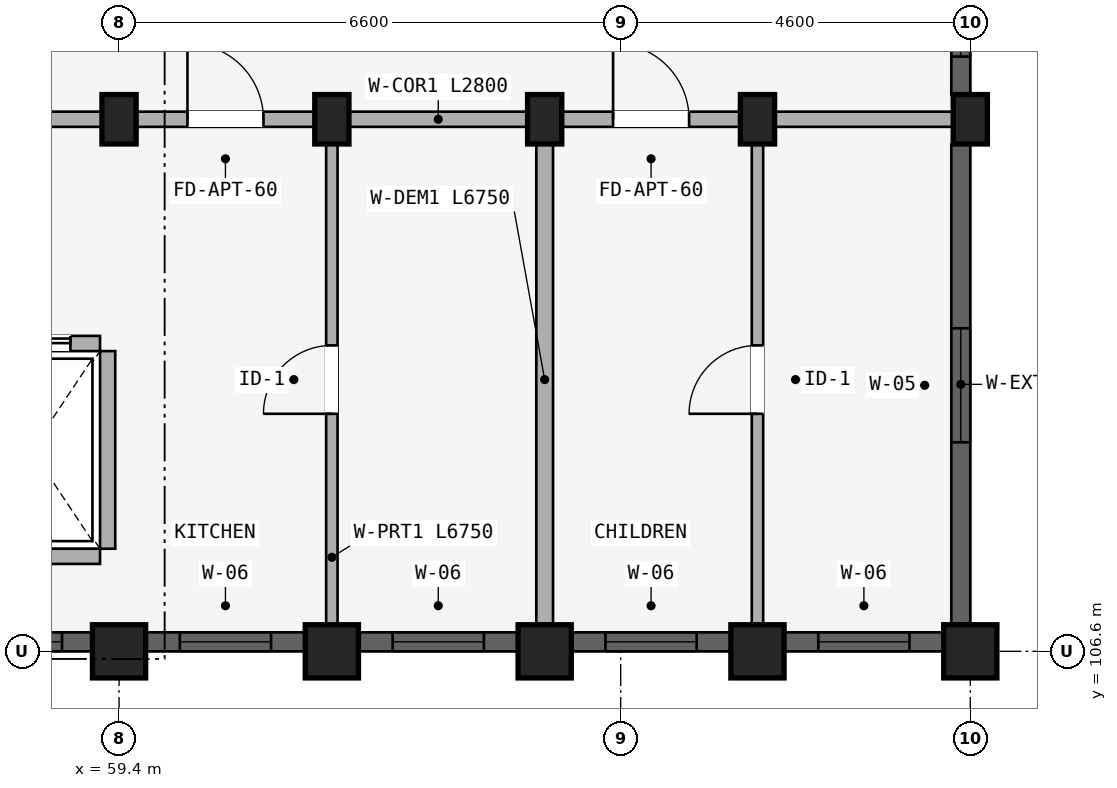
"""IFC4 building model, lengths in metres.
Left out: names, types, materials, properties, quantities, classifications, styles, units other than length and angle.
Written with IfcOpenShell. Run it as: python <this file> out.ifc"""

import sys

from ifc_helpers import new_model, si_unit, direction, frame, frame_2d, origin, origin_2d, place, context, subcontext, project, spatial, rectangle, extrude, element, fill, save


model = new_model("IFC4")
c1 = context("Model", 3, precision=1e-05, world=origin(), true_north=direction((0.0, 1.0)))
c2 = subcontext(c1, "Body", "Model", "MODEL_VIEW")
j1 = project(units=[si_unit("LENGTHUNIT", "METRE"), si_unit("PLANEANGLEUNIT", "RADIAN")], contexts=[c1])
p1 = place(None, origin())
s1 = spatial("IfcSite", under=j1, at=p1, CompositionType="ELEMENT")
p2 = place(p1, origin())
s2 = spatial("IfcBuilding", under=s1, at=p2, CompositionType="ELEMENT")
p3 = place(p2, frame((0.0, 0.0, 27.6)))
s3 = spatial("IfcBuildingStorey", under=s2, at=p3, CompositionType="ELEMENT", Elevation=27.6)
p4 = place(p3, frame((59.4, 106.6, 0.0), z_axis=(0.0, 0.0, 1.0), x_axis=(1.0, 0.0, 0.0)))
e1 = element("IfcColumn", 1, at=p4, inside=s3, PredefinedType="COLUMN", context=c2, shape_type="SweptSolid", body=[
    extrude(rectangle(XDim=0.7, YDim=0.7, at=origin_2d()), origin(), (0.0, 0.0, 1.0), 2.93),
])
p5 = place(p3, frame((59.4, 113.6, 0.0), z_axis=(0.0, 0.0, 1.0), x_axis=(1.0, 0.0, 0.0)))
e2 = element("IfcColumn", 2, at=p5, inside=s3, PredefinedType="COLUMN", context=c2, shape_type="SweptSolid", body=[
    extrude(rectangle(XDim=0.45, YDim=0.65, at=origin_2d()), origin(), (0.0, 0.0, 1.0), 2.93),
])
p6 = place(p3, frame((62.2, 106.6, 0.0), z_axis=(0.0, 0.0, 1.0), x_axis=(1.0, 0.0, 0.0)))
e3 = element("IfcColumn", 3, at=p6, inside=s3, PredefinedType="COLUMN", context=c2, shape_type="SweptSolid", body=[
    extrude(rectangle(XDim=0.7, YDim=0.7, at=origin_2d()), origin(), (0.0, 0.0, 1.0), 2.93),
])
p7 = place(p3, frame((62.2, 113.6, 0.0), z_axis=(0.0, 0.0, 1.0), x_axis=(1.0, 0.0, 0.0)))
e4 = element("IfcColumn", 4, at=p7, inside=s3, PredefinedType="COLUMN", context=c2, shape_type="SweptSolid", body=[
    extrude(rectangle(XDim=0.45, YDim=0.65, at=origin_2d()), origin(), (0.0, 0.0, 1.0), 2.93),
])
p8 = place(p3, frame((65.0, 106.6, 0.0), z_axis=(0.0, 0.0, 1.0), x_axis=(1.0, 0.0, 0.0)))
e5 = element("IfcColumn", 5, at=p8, inside=s3, PredefinedType="COLUMN", context=c2, shape_type="SweptSolid", body=[
    extrude(rectangle(XDim=0.7, YDim=0.7, at=origin_2d()), origin(), (0.0, 0.0, 1.0), 2.93),
])
p9 = place(p3, frame((65.0, 113.6, 0.0), z_axis=(0.0, 0.0, 1.0), x_axis=(1.0, 0.0, 0.0)))
e6 = element("IfcColumn", 6, at=p9, inside=s3, PredefinedType="COLUMN", context=c2, shape_type="SweptSolid", body=[
    extrude(rectangle(XDim=0.45, YDim=0.65, at=origin_2d()), origin(), (0.0, 0.0, 1.0), 2.93),
])
p10 = place(p3, frame((67.8, 106.6, 0.0), z_axis=(0.0, 0.0, 1.0), x_axis=(1.0, 0.0, 0.0)))
e7 = element("IfcColumn", 7, at=p10, inside=s3, PredefinedType="COLUMN", context=c2, shape_type="SweptSolid", body=[
    extrude(rectangle(XDim=0.7, YDim=0.7, at=origin_2d()), origin(), (0.0, 0.0, 1.0), 2.93),
])
p11 = place(p3, frame((67.8, 113.6, 0.0), z_axis=(0.0, 0.0, 1.0), x_axis=(1.0, 0.0, 0.0)))
e8 = element("IfcColumn", 8, at=p11, inside=s3, PredefinedType="COLUMN", context=c2, shape_type="SweptSolid", body=[
    extrude(rectangle(XDim=0.45, YDim=0.65, at=origin_2d()), origin(), (0.0, 0.0, 1.0), 2.93),
])
p12 = place(p3, frame((70.6, 106.6, 0.0), z_axis=(0.0, 0.0, 1.0), x_axis=(1.0, 0.0, 0.0)))
e9 = element("IfcColumn", 9, at=p12, inside=s3, PredefinedType="COLUMN", context=c2, shape_type="SweptSolid", body=[
    extrude(rectangle(XDim=0.7, YDim=0.7, at=origin_2d()), origin(), (0.0, 0.0, 1.0), 2.93),
])
p13 = place(p3, frame((70.6, 113.6, 0.0), z_axis=(0.0, 0.0, 1.0), x_axis=(1.0, 0.0, 0.0)))
e10 = element("IfcColumn", 10, at=p13, inside=s3, PredefinedType="COLUMN", context=c2, shape_type="SweptSolid", body=[
    extrude(rectangle(XDim=0.45, YDim=0.65, at=origin_2d()), origin(), (0.0, 0.0, 1.0), 2.93),
])
p14 = place(p3, frame((59.25, 107.95, 0.0), z_axis=(0.0, 0.0, 1.0), x_axis=(0.0, 1.0, 0.0)))
e11 = element("IfcWall", 11, at=p14, inside=s3, PredefinedType="STANDARD", context=c2, shape_type="SweptSolid", body=[
    extrude(rectangle(XDim=2.6, YDim=0.2, at=frame_2d((1.3, 0.0))), origin(), (0.0, 0.0, 1.0), 2.372),
])
p15 = place(p3, frame((57.35, 107.85, 0.0), z_axis=(0.0, 0.0, 1.0), x_axis=(1.0, 0.0, 0.0)))
e12 = element("IfcWall", 12, at=p15, inside=s3, PredefinedType="STANDARD", context=c2, shape_type="SweptSolid", body=[
    extrude(rectangle(XDim=1.8, YDim=0.2, at=frame_2d((0.9, 0.0))), origin(), (0.0, 0.0, 1.0), 2.93),
])
p16 = place(p3, frame((57.35, 110.65, 0.0), z_axis=(0.0, 0.0, 1.0), x_axis=(1.0, 0.0, 0.0)))
e13 = element("IfcWall", 13, at=p16, inside=s3, PredefinedType="STANDARD", context=c2, shape_type="SweptSolid", body=[
    extrude(rectangle(XDim=1.8, YDim=0.2, at=frame_2d((0.9, 0.0))), origin(), (0.0, 0.0, 1.0), 2.93),
])
p17 = place(p16, frame((0.39, 0.0, 0.0)))
e14 = element("IfcOpeningElement", 14, at=p17, cuts=e13, PredefinedType="OPENING", context=c2, shape_type="SweptSolid", body=[
    extrude(rectangle(XDim=1.02, YDim=2.15, at=frame_2d((0.51, 1.075))), frame((0.0, 0.11, 0.0), z_axis=(0.0, -1.0, 0.0), x_axis=(1.0, 0.0, 0.0)), (0.0, 0.0, 1.0), 0.22),
])
p18 = place(p3, frame((53.75, 113.6, 0.0), z_axis=(0.0, 0.0, 1.0), x_axis=(1.0, 0.0, 0.0)))
e15 = element("IfcWall", 15, at=p18, inside=s3, PredefinedType="STANDARD", context=c2, shape_type="SweptSolid", body=[
    extrude(rectangle(XDim=5.6, YDim=0.2, at=frame_2d((2.8, 0.0))), origin(), (0.0, 0.0, 1.0), 2.372),
])
p19 = place(p18, frame((1.91, 0.0, 0.0)))
e16 = element("IfcOpeningElement", 16, at=p19, cuts=e15, PredefinedType="OPENING", context=c2, shape_type="SweptSolid", body=[
    extrude(rectangle(XDim=1.22, YDim=2.15, at=frame_2d((0.61, 1.075))), frame((0.0, 0.11, 0.0), z_axis=(0.0, -1.0, 0.0), x_axis=(1.0, 0.0, 0.0)), (0.0, 0.0, 1.0), 0.22),
])
p20 = place(p3, frame((59.4, 113.6, 0.0), z_axis=(0.0, 0.0, 1.0), x_axis=(1.0, 0.0, 0.0)))
e17 = element("IfcWall", 17, at=p20, inside=s3, PredefinedType="STANDARD", context=c2, shape_type="SweptSolid", body=[
    extrude(rectangle(XDim=2.8, YDim=0.2, at=frame_2d((1.4, 0.0))), origin(), (0.0, 0.0, 1.0), 2.372),
])
p21 = place(p20, frame((0.9, 0.0, 0.0)))
e18 = element("IfcOpeningElement", 18, at=p21, cuts=e17, PredefinedType="OPENING", context=c2, shape_type="SweptSolid", body=[
    extrude(rectangle(XDim=1.0, YDim=2.15, at=frame_2d((0.5, 1.075))), frame((0.0, 0.11, 0.0), z_axis=(0.0, -1.0, 0.0), x_axis=(1.0, 0.0, 0.0)), (0.0, 0.0, 1.0), 0.22),
])
p22 = place(p3, frame((62.2, 113.6, 0.0), z_axis=(0.0, 0.0, 1.0), x_axis=(1.0, 0.0, 0.0)))
e19 = element("IfcWall", 19, at=p22, inside=s3, PredefinedType="STANDARD", context=c2, shape_type="SweptSolid", body=[
    extrude(rectangle(XDim=2.8, YDim=0.2, at=frame_2d((1.4, 0.0))), origin(), (0.0, 0.0, 1.0), 2.372),
])
p23 = place(p3, frame((65.0, 113.6, 0.0), z_axis=(0.0, 0.0, 1.0), x_axis=(1.0, 0.0, 0.0)))
e20 = element("IfcWall", 20, at=p23, inside=s3, PredefinedType="STANDARD", context=c2, shape_type="SweptSolid", body=[
    extrude(rectangle(XDim=2.8, YDim=0.2, at=frame_2d((1.4, 0.0))), origin(), (0.0, 0.0, 1.0), 2.372),
])
p24 = place(p23, frame((0.9, 0.0, 0.0)))
e21 = element("IfcOpeningElement", 21, at=p24, cuts=e20, PredefinedType="OPENING", context=c2, shape_type="SweptSolid", body=[
    extrude(rectangle(XDim=1.0, YDim=2.15, at=frame_2d((0.5, 1.075))), frame((0.0, 0.11, 0.0), z_axis=(0.0, -1.0, 0.0), x_axis=(1.0, 0.0, 0.0)), (0.0, 0.0, 1.0), 0.22),
])
p25 = place(p3, frame((67.8, 113.6, 0.0), z_axis=(0.0, 0.0, 1.0), x_axis=(1.0, 0.0, 0.0)))
e22 = element("IfcWall", 22, at=p25, inside=s3, PredefinedType="STANDARD", context=c2, shape_type="SweptSolid", body=[
    extrude(rectangle(XDim=2.8, YDim=0.2, at=frame_2d((1.4, 0.0))), origin(), (0.0, 0.0, 1.0), 2.372),
])
p26 = place(p3, frame((62.2, 106.8, 0.0), z_axis=(0.0, 0.0, 1.0), x_axis=(0.0, 1.0, 0.0)))
e23 = element("IfcWall", 23, at=p26, inside=s3, PredefinedType="PARTITIONING", context=c2, shape_type="SweptSolid", body=[
    extrude(rectangle(XDim=6.75, YDim=0.15, at=frame_2d((3.375, 0.0))), origin(), (0.0, 0.0, 1.0), 2.372),
])
p27 = place(p26, frame((2.925, 0.0, 0.0)))
e24 = element("IfcOpeningElement", 24, at=p27, cuts=e23, PredefinedType="OPENING", context=c2, shape_type="SweptSolid", body=[
    extrude(rectangle(XDim=0.9, YDim=2.1, at=frame_2d((0.45, 1.05))), frame((0.0, 0.085, 0.0), z_axis=(0.0, -1.0, 0.0), x_axis=(1.0, 0.0, 0.0)), (0.0, 0.0, 1.0), 0.17),
])
p28 = place(p3, frame((65.0, 106.8, 0.0), z_axis=(0.0, 0.0, 1.0), x_axis=(0.0, 1.0, 0.0)))
e25 = element("IfcWall", 25, at=p28, inside=s3, PredefinedType="STANDARD", context=c2, shape_type="SweptSolid", body=[
    extrude(rectangle(XDim=6.75, YDim=0.22, at=frame_2d((3.375, 0.0))), origin(), (0.0, 0.0, 1.0), 2.372),
])
p29 = place(p3, frame((67.8, 106.8, 0.0), z_axis=(0.0, 0.0, 1.0), x_axis=(0.0, 1.0, 0.0)))
e26 = element("IfcWall", 26, at=p29, inside=s3, PredefinedType="PARTITIONING", context=c2, shape_type="SweptSolid", body=[
    extrude(rectangle(XDim=6.75, YDim=0.15, at=frame_2d((3.375, 0.0))), origin(), (0.0, 0.0, 1.0), 2.372),
])
p30 = place(p29, frame((2.925, 0.0, 0.0)))
e27 = element("IfcOpeningElement", 27, at=p30, cuts=e26, PredefinedType="OPENING", context=c2, shape_type="SweptSolid", body=[
    extrude(rectangle(XDim=0.9, YDim=2.1, at=frame_2d((0.45, 1.05))), frame((0.0, 0.085, 0.0), z_axis=(0.0, -1.0, 0.0), x_axis=(1.0, 0.0, 0.0)), (0.0, 0.0, 1.0), 0.17),
])
p31 = place(p3, frame((56.628, 106.725, 0.0), z_axis=(0.0, 0.0, 1.0), x_axis=(1.0, 0.0, 0.0)))
e28 = element("IfcWall", 28, at=p31, inside=s3, PredefinedType="STANDARD", context=c2, shape_type="SweptSolid", body=[
    extrude(rectangle(XDim=2.422, YDim=0.25, at=frame_2d((1.211, 0.0))), origin(), (0.0, 0.0, 1.0), 2.472),
])
p32 = place(p31, frame((0.822, 0.0, 0.772)))
e29 = element("IfcOpeningElement", 29, at=p32, cuts=e28, PredefinedType="OPENING", context=c2, shape_type="SweptSolid", body=[
    extrude(rectangle(XDim=1.2, YDim=1.5, at=frame_2d((0.6, 0.75))), frame((0.0, 0.135, 0.0), z_axis=(0.0, -1.0, 0.0), x_axis=(1.0, 0.0, 0.0)), (0.0, 0.0, 1.0), 0.27),
])
p33 = place(p3, frame((59.753, 106.725, 0.0), z_axis=(0.0, 0.0, 1.0), x_axis=(1.0, 0.0, 0.0)))
e30 = element("IfcWall", 30, at=p33, inside=s3, PredefinedType="STANDARD", context=c2, shape_type="SweptSolid", body=[
    extrude(rectangle(XDim=2.093, YDim=0.25, at=frame_2d((1.046, 0.0))), origin(), (0.0, 0.0, 1.0), 2.472),
])
p34 = place(p33, frame((0.447, 0.0, 0.772)))
e31 = element("IfcOpeningElement", 31, at=p34, cuts=e30, PredefinedType="OPENING", context=c2, shape_type="SweptSolid", body=[
    extrude(rectangle(XDim=1.2, YDim=1.5, at=frame_2d((0.6, 0.75))), frame((0.0, 0.135, 0.0), z_axis=(0.0, -1.0, 0.0), x_axis=(1.0, 0.0, 0.0)), (0.0, 0.0, 1.0), 0.27),
])
p35 = place(p3, frame((62.553, 106.725, 0.0), z_axis=(0.0, 0.0, 1.0), x_axis=(1.0, 0.0, 0.0)))
e32 = element("IfcWall", 32, at=p35, inside=s3, PredefinedType="STANDARD", context=c2, shape_type="SweptSolid", body=[
    extrude(rectangle(XDim=2.093, YDim=0.25, at=frame_2d((1.046, 0.0))), origin(), (0.0, 0.0, 1.0), 2.472),
])
p36 = place(p35, frame((0.447, 0.0, 0.772)))
e33 = element("IfcOpeningElement", 33, at=p36, cuts=e32, PredefinedType="OPENING", context=c2, shape_type="SweptSolid", body=[
    extrude(rectangle(XDim=1.2, YDim=1.5, at=frame_2d((0.6, 0.75))), frame((0.0, 0.135, 0.0), z_axis=(0.0, -1.0, 0.0), x_axis=(1.0, 0.0, 0.0)), (0.0, 0.0, 1.0), 0.27),
])
p37 = place(p3, frame((65.354, 106.725, 0.0), z_axis=(0.0, 0.0, 1.0), x_axis=(1.0, 0.0, 0.0)))
e34 = element("IfcWall", 34, at=p37, inside=s3, PredefinedType="STANDARD", context=c2, shape_type="SweptSolid", body=[
    extrude(rectangle(XDim=2.093, YDim=0.25, at=frame_2d((1.046, 0.0))), origin(), (0.0, 0.0, 1.0), 2.472),
])
p38 = place(p37, frame((0.447, 0.0, 0.772)))
e35 = element("IfcOpeningElement", 35, at=p38, cuts=e34, PredefinedType="OPENING", context=c2, shape_type="SweptSolid", body=[
    extrude(rectangle(XDim=1.2, YDim=1.5, at=frame_2d((0.6, 0.75))), frame((0.0, 0.135, 0.0), z_axis=(0.0, -1.0, 0.0), x_axis=(1.0, 0.0, 0.0)), (0.0, 0.0, 1.0), 0.27),
])
p39 = place(p3, frame((68.154, 106.725, 0.0), z_axis=(0.0, 0.0, 1.0), x_axis=(1.0, 0.0, 0.0)))
e36 = element("IfcWall", 36, at=p39, inside=s3, PredefinedType="STANDARD", context=c2, shape_type="SweptSolid", body=[
    extrude(rectangle(XDim=2.093, YDim=0.25, at=frame_2d((1.046, 0.0))), origin(), (0.0, 0.0, 1.0), 2.472),
])
p40 = place(p39, frame((0.447, 0.0, 0.772)))
e37 = element("IfcOpeningElement", 37, at=p40, cuts=e36, PredefinedType="OPENING", context=c2, shape_type="SweptSolid", body=[
    extrude(rectangle(XDim=1.2, YDim=1.5, at=frame_2d((0.6, 0.75))), frame((0.0, 0.135, 0.0), z_axis=(0.0, -1.0, 0.0), x_axis=(1.0, 0.0, 0.0)), (0.0, 0.0, 1.0), 0.27),
])
p41 = place(p3, frame((70.475, 106.954, 0.0), z_axis=(0.0, 0.0, 1.0), x_axis=(0.0, 1.0, 0.0)))
e38 = element("IfcWall", 38, at=p41, inside=s3, PredefinedType="STANDARD", context=c2, shape_type="SweptSolid", body=[
    extrude(rectangle(XDim=6.318, YDim=0.25, at=frame_2d((3.159, 0.0))), origin(), (0.0, 0.0, 1.0), 2.372),
])
p42 = place(p41, frame((2.396, 0.0, 0.522)))
e39 = element("IfcOpeningElement", 39, at=p42, cuts=e38, PredefinedType="OPENING", context=c2, shape_type="SweptSolid", body=[
    extrude(rectangle(XDim=1.5, YDim=1.65, at=frame_2d((0.75, 0.825))), frame((0.0, 0.135, 0.0), z_axis=(0.0, -1.0, 0.0), x_axis=(1.0, 0.0, 0.0)), (0.0, 0.0, 1.0), 0.27),
])
p43 = place(p3, frame((70.475, 113.928, 0.0), z_axis=(0.0, 0.0, 1.0), x_axis=(0.0, 1.0, 0.0)))
e40 = element("IfcWall", 40, at=p43, inside=s3, PredefinedType="STANDARD", context=c2, shape_type="SweptSolid", body=[
    extrude(rectangle(XDim=1.743, YDim=0.25, at=frame_2d((0.872, 0.0))), origin(), (0.0, 0.0, 1.0), 2.372),
])
p44 = place(p43, frame((0.497, 0.0, 0.88)))
e41 = element("IfcOpeningElement", 41, at=p44, cuts=e40, PredefinedType="OPENING", context=c2, shape_type="SweptSolid", body=[
    extrude(rectangle(XDim=0.75, YDim=1.05, at=frame_2d((0.375, 0.525))), frame((0.0, 0.135, 0.0), z_axis=(0.0, -1.0, 0.0), x_axis=(1.0, 0.0, 0.0)), (0.0, 0.0, 1.0), 0.27),
])
p45 = place(p32, origin())
e42 = element("IfcWindow", 42, at=p45, inside=s3, PartitioningType="SINGLE_PANEL", PredefinedType="WINDOW", context=c2, shape_type="SweptSolid", body=[
    extrude(rectangle(XDim=1.2, YDim=1.5, at=frame_2d((0.6, 0.75))), frame((0.0, 0.03, 0.0), z_axis=(0.0, -1.0, 0.0), x_axis=(1.0, 0.0, 0.0)), (0.0, 0.0, 1.0), 0.06),
])
fill(e29, e42)
p46 = place(p34, origin())
e43 = element("IfcWindow", 43, at=p46, inside=s3, PartitioningType="SINGLE_PANEL", PredefinedType="WINDOW", context=c2, shape_type="SweptSolid", body=[
    extrude(rectangle(XDim=1.2, YDim=1.5, at=frame_2d((0.6, 0.75))), frame((0.0, 0.03, 0.0), z_axis=(0.0, -1.0, 0.0), x_axis=(1.0, 0.0, 0.0)), (0.0, 0.0, 1.0), 0.06),
])
fill(e31, e43)
p47 = place(p36, origin())
e44 = element("IfcWindow", 44, at=p47, inside=s3, PartitioningType="SINGLE_PANEL", PredefinedType="WINDOW", context=c2, shape_type="SweptSolid", body=[
    extrude(rectangle(XDim=1.2, YDim=1.5, at=frame_2d((0.6, 0.75))), frame((0.0, 0.03, 0.0), z_axis=(0.0, -1.0, 0.0), x_axis=(1.0, 0.0, 0.0)), (0.0, 0.0, 1.0), 0.06),
])
fill(e33, e44)
p48 = place(p38, origin())
e45 = element("IfcWindow", 45, at=p48, inside=s3, PartitioningType="SINGLE_PANEL", PredefinedType="WINDOW", context=c2, shape_type="SweptSolid", body=[
    extrude(rectangle(XDim=1.2, YDim=1.5, at=frame_2d((0.6, 0.75))), frame((0.0, 0.03, 0.0), z_axis=(0.0, -1.0, 0.0), x_axis=(1.0, 0.0, 0.0)), (0.0, 0.0, 1.0), 0.06),
])
fill(e35, e45)
p49 = place(p40, origin())
e46 = element("IfcWindow", 46, at=p49, inside=s3, PartitioningType="SINGLE_PANEL", PredefinedType="WINDOW", context=c2, shape_type="SweptSolid", body=[
    extrude(rectangle(XDim=1.2, YDim=1.5, at=frame_2d((0.6, 0.75))), frame((0.0, 0.03, 0.0), z_axis=(0.0, -1.0, 0.0), x_axis=(1.0, 0.0, 0.0)), (0.0, 0.0, 1.0), 0.06),
])
fill(e37, e46)
p50 = place(p42, origin())
e47 = element("IfcWindow", 47, at=p50, inside=s3, PartitioningType="DOUBLE_PANEL_VERTICAL", PredefinedType="WINDOW", context=c2, shape_type="SweptSolid", body=[
    extrude(rectangle(XDim=1.5, YDim=1.65, at=frame_2d((0.75, 0.825))), frame((0.0, 0.03, 0.0), z_axis=(0.0, -1.0, 0.0), x_axis=(1.0, 0.0, 0.0)), (0.0, 0.0, 1.0), 0.06),
])
fill(e39, e47)
p51 = place(p44, origin())
e48 = element("IfcWindow", 48, at=p51, inside=s3, PartitioningType="SINGLE_PANEL", PredefinedType="WINDOW", context=c2, shape_type="SweptSolid", body=[
    extrude(rectangle(XDim=0.75, YDim=1.05, at=frame_2d((0.375, 0.525))), frame((0.0, 0.03, 0.0), z_axis=(0.0, -1.0, 0.0), x_axis=(1.0, 0.0, 0.0)), (0.0, 0.0, 1.0), 0.06),
])
fill(e41, e48)
p52 = place(p17, origin())
e49 = element("IfcDoor", 49, at=p52, inside=s3, OperationType="SLIDING_TO_RIGHT", PredefinedType="DOOR", context=c2, shape_type="SweptSolid", body=[
    extrude(rectangle(XDim=1.02, YDim=2.15, at=frame_2d((0.51, 1.075))), frame((0.0, 0.025, 0.0), z_axis=(0.0, -1.0, 0.0), x_axis=(1.0, 0.0, 0.0)), (0.0, 0.0, 1.0), 0.05),
])
fill(e14, e49)
p53 = place(p21, origin())
e50 = element("IfcDoor", 50, at=p53, inside=s3, OperationType="SINGLE_SWING_LEFT", PredefinedType="DOOR", context=c2, shape_type="SweptSolid", body=[
    extrude(rectangle(XDim=1.0, YDim=2.15, at=frame_2d((0.5, 1.075))), frame((0.0, 0.025, 0.0), z_axis=(0.0, -1.0, 0.0), x_axis=(1.0, 0.0, 0.0)), (0.0, 0.0, 1.0), 0.05),
])
fill(e18, e50)
p54 = place(p24, origin())
e51 = element("IfcDoor", 51, at=p54, inside=s3, OperationType="SINGLE_SWING_LEFT", PredefinedType="DOOR", context=c2, shape_type="SweptSolid", body=[
    extrude(rectangle(XDim=1.0, YDim=2.15, at=frame_2d((0.5, 1.075))), frame((0.0, 0.025, 0.0), z_axis=(0.0, -1.0, 0.0), x_axis=(1.0, 0.0, 0.0)), (0.0, 0.0, 1.0), 0.05),
])
fill(e21, e51)
p55 = place(p27, frame((0.9, 0.0, 0.0), z_axis=(0.0, 0.0, 1.0), x_axis=(-1.0, 0.0, 0.0)))
e52 = element("IfcDoor", 52, at=p55, inside=s3, OperationType="SINGLE_SWING_RIGHT", PredefinedType="DOOR", context=c2, shape_type="SweptSolid", body=[
    extrude(rectangle(XDim=0.9, YDim=2.1, at=frame_2d((0.45, 1.05))), frame((0.0, 0.025, 0.0), z_axis=(0.0, -1.0, 0.0), x_axis=(1.0, 0.0, 0.0)), (0.0, 0.0, 1.0), 0.05),
])
fill(e24, e52)
p56 = place(p30, origin())
e53 = element("IfcDoor", 53, at=p56, inside=s3, OperationType="SINGLE_SWING_LEFT", PredefinedType="DOOR", context=c2, shape_type="SweptSolid", body=[
    extrude(rectangle(XDim=0.9, YDim=2.1, at=frame_2d((0.45, 1.05))), frame((0.0, 0.025, 0.0), z_axis=(0.0, -1.0, 0.0), x_axis=(1.0, 0.0, 0.0)), (0.0, 0.0, 1.0), 0.05),
])
fill(e27, e53)
save(model, sys.argv[1])
